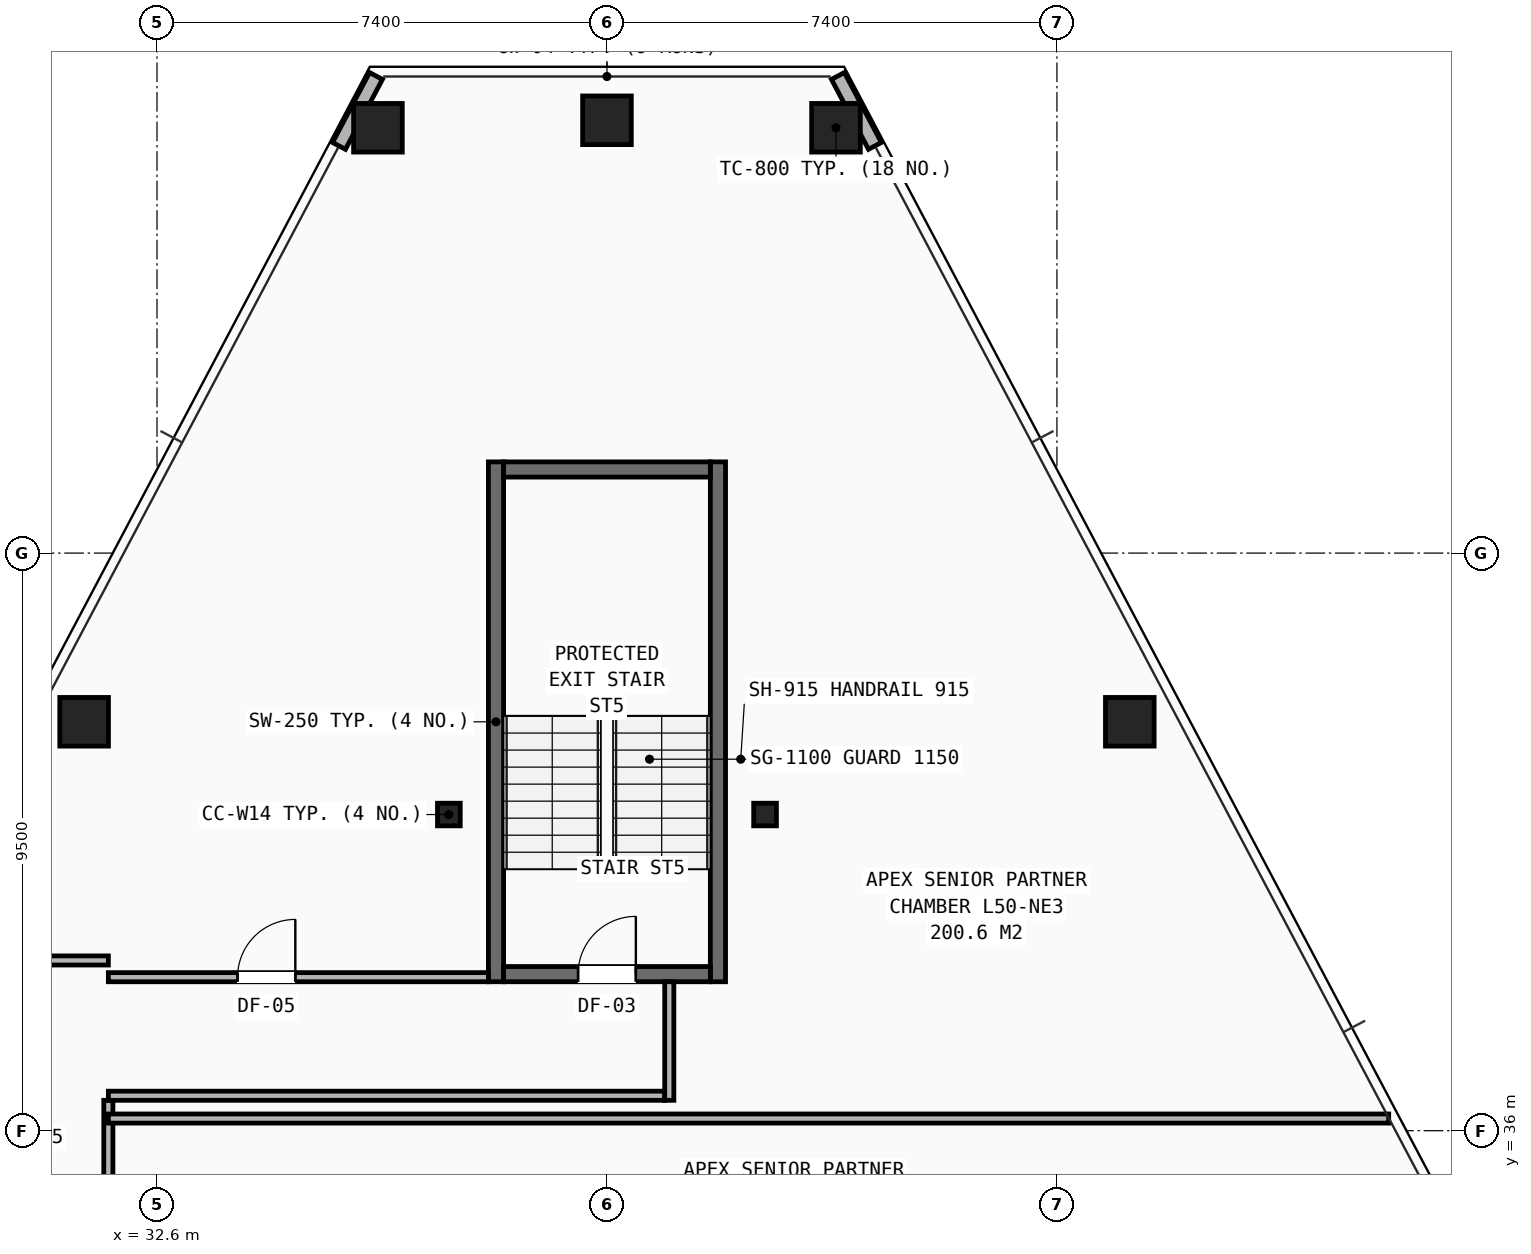
"""IFC4 building model, lengths in metres.
Left out: names, types, materials, properties, quantities, classifications, styles, units other than length and angle.
Written with IfcOpenShell. Run it as: python <this file> out.ifc"""

import sys

from ifc_helpers import new_model, si_unit, direction, frame, frame_2d, origin, origin_2d, place, context, subcontext, project, spatial, rectangle, hollow_rectangle, i_section, extrude, element, fill, save


model = new_model("IFC4")
c1 = context("Model", 3, precision=1e-05, world=origin(), true_north=direction((0.0, 1.0)))
c2 = subcontext(c1, "Body", "Model", "MODEL_VIEW")
j1 = project(units=[si_unit("LENGTHUNIT", "METRE"), si_unit("PLANEANGLEUNIT", "RADIAN")], contexts=[c1])
p1 = place(None, origin())
s1 = spatial("IfcSite", under=j1, at=p1, CompositionType="ELEMENT")
p2 = place(p1, origin())
s2 = spatial("IfcBuilding", under=s1, at=p2, CompositionType="ELEMENT")
p3 = place(p2, frame((0.0, 0.0, 175.8)))
s3 = spatial("IfcBuildingStorey", under=s2, at=p3, CompositionType="ELEMENT", Elevation=175.8)
for number, where, z_axis, x_axis in (
    (1, (37.4, 41.2, 0.0), (0.0, 0.0, 1.0), (1.0, 0.0, 0.0)),
    (2, (42.6, 41.2, 0.0), (0.0, 0.0, 1.0), (1.0, 0.0, 0.0)),
):
    element("IfcColumn", number, at=place(p3, frame(where, z_axis=z_axis, x_axis=x_axis)), inside=s3, PredefinedType="COLUMN", context=c2, shape_type="SweptSolid", body=[
        extrude(i_section(OverallWidth=0.374, OverallDepth=0.372, WebThickness=0.016, FlangeThickness=0.026, at=origin_2d()), origin(), (0.0, 0.0, 1.0), 3.45),
    ])
for number, where, z_axis, x_axis in (
    (3, (43.767, 52.495, 0.0), (0.0, 0.0, 1.0), (1.0, 0.0, 0.0)),
    (4, (40.0, 52.618, 0.0), (0.0, 0.0, 1.0), (1.0, 0.0, 0.0)),
    (5, (36.233, 52.495, 0.0), (0.0, 0.0, 1.0), (1.0, 0.0, 0.0)),
    (6, (31.402, 42.726, 0.0), (0.0, 0.0, 1.0), (1.0, 0.0, 0.0)),
    (7, (48.598, 42.726, 0.0), (0.0, 0.0, 1.0), (1.0, 0.0, 0.0)),
):
    element("IfcColumn", number, at=place(p3, frame(where, z_axis=z_axis, x_axis=x_axis)), inside=s3, PredefinedType="COLUMN", context=c2, shape_type="SweptSolid", body=[
        extrude(hollow_rectangle(XDim=0.8, YDim=0.8, WallThickness=0.055, at=origin_2d()), origin(), (0.0, 0.0, 1.0), 3.45),
    ])
for number, where, z_axis, x_axis in (
    (8, (36.201, 53.347, 0.0), (0.0, 0.0, 1.0), (-0.467, -0.884, 0.0)),
    (9, (44.407, 52.197, 0.0), (0.0, 0.0, 1.0), (-0.467, 0.884, 0.0)),
):
    element("IfcWall", number, at=place(p3, frame(where, z_axis=z_axis, x_axis=x_axis)), inside=s3, PredefinedType="SHEAR", context=c2, shape_type="SweptSolid", body=[
        extrude(rectangle(XDim=1.302, YDim=0.24, at=frame_2d((0.651, 0.0))), origin(), (0.0, 0.0, 1.0), 2.583),
    ])
p4 = place(p3, frame((31.8, 31.2, 0.0), z_axis=(0.0, 0.0, 1.0), x_axis=(0.0, 1.0, 0.0)))
e10 = element("IfcWall", 10, at=p4, inside=s3, PredefinedType="PARTITIONING", context=c2, shape_type="SweptSolid", body=[
    extrude(rectangle(XDim=5.3, YDim=0.15, at=frame_2d((2.65, 0.0))), origin(), (0.0, 0.0, 1.0), 2.252),
])
p5 = place(p4, frame((0.5, 0.0, 0.0)))
e11 = element("IfcOpeningElement", 11, at=p5, cuts=e10, PredefinedType="OPENING", context=c2, shape_type="SweptSolid", body=[
    extrude(rectangle(XDim=0.95, YDim=2.1, at=frame_2d((0.475, 1.05))), frame((0.0, 0.085, 0.0), z_axis=(0.0, -1.0, 0.0), x_axis=(1.0, 0.0, 0.0)), (0.0, 0.0, 1.0), 0.17),
])
p6 = place(p4, frame((2.9, 0.0, 0.0)))
e12 = element("IfcOpeningElement", 12, at=p6, cuts=e10, PredefinedType="OPENING", context=c2, shape_type="SweptSolid", body=[
    extrude(rectangle(XDim=0.95, YDim=2.1, at=frame_2d((0.475, 1.05))), frame((0.0, 0.085, 0.0), z_axis=(0.0, -1.0, 0.0), x_axis=(1.0, 0.0, 0.0)), (0.0, 0.0, 1.0), 0.17),
])
p7 = place(p3, frame((29.6, 38.8, 0.0), z_axis=(0.0, 0.0, 1.0), x_axis=(1.0, 0.0, 0.0)))
e13 = element("IfcWall", 13, at=p7, inside=s3, PredefinedType="PARTITIONING", context=c2, shape_type="SweptSolid", body=[
    extrude(rectangle(XDim=2.2, YDim=0.15, at=frame_2d((1.1, 0.0))), origin(), (0.0, 0.0, 1.0), 2.589),
])
p8 = place(p3, frame((31.8, 36.2, 0.0), z_axis=(0.0, 0.0, 1.0), x_axis=(1.0, 0.0, 0.0)))
e14 = element("IfcWall", 14, at=p8, inside=s3, PredefinedType="PARTITIONING", context=c2, shape_type="SweptSolid", body=[
    extrude(rectangle(XDim=21.056, YDim=0.15, at=frame_2d((10.528, 0.0))), origin(), (0.0, 0.0, 1.0), 2.589),
])
for number, where, z_axis, x_axis in (
    (15, (38.175, 38.45, 0.0), (0.0, 0.0, 1.0), (0.0, 1.0, 0.0)),
    (16, (41.825, 38.45, 0.0), (0.0, 0.0, 1.0), (0.0, 1.0, 0.0)),
):
    element("IfcWall", number, at=place(p3, frame(where, z_axis=z_axis, x_axis=x_axis)), inside=s3, PredefinedType="SHEAR", context=c2, shape_type="SweptSolid", body=[
        extrude(rectangle(XDim=8.55, YDim=0.25, at=frame_2d((4.275, 0.0))), origin(), (0.0, 0.0, 1.0), 3.21),
    ])
p9 = place(p3, frame((38.3, 38.575, 0.0), z_axis=(0.0, 0.0, 1.0), x_axis=(1.0, 0.0, 0.0)))
e17 = element("IfcWall", 17, at=p9, inside=s3, PredefinedType="SHEAR", context=c2, shape_type="SweptSolid", body=[
    extrude(rectangle(XDim=3.4, YDim=0.25, at=frame_2d((1.7, 0.0))), origin(), (0.0, 0.0, 1.0), 3.21),
])
p10 = place(p9, frame((1.225, 0.0, 0.0)))
e18 = element("IfcOpeningElement", 18, at=p10, cuts=e17, PredefinedType="OPENING", context=c2, shape_type="SweptSolid", body=[
    extrude(rectangle(XDim=0.95, YDim=2.1, at=frame_2d((0.475, 1.05))), frame((0.0, 0.135, 0.0), z_axis=(0.0, -1.0, 0.0), x_axis=(1.0, 0.0, 0.0)), (0.0, 0.0, 1.0), 0.27),
])
p11 = place(p3, frame((38.3, 46.875, 0.0), z_axis=(0.0, 0.0, 1.0), x_axis=(1.0, 0.0, 0.0)))
e19 = element("IfcWall", 19, at=p11, inside=s3, PredefinedType="SHEAR", context=c2, shape_type="SweptSolid", body=[
    extrude(rectangle(XDim=3.4, YDim=0.25, at=frame_2d((1.7, 0.0))), origin(), (0.0, 0.0, 1.0), 3.21),
])
p12 = place(p3, frame((31.8, 36.575, 0.0), z_axis=(0.0, 0.0, 1.0), x_axis=(1.0, 0.0, 0.0)))
e20 = element("IfcWall", 20, at=p12, inside=s3, PredefinedType="PARTITIONING", context=c2, shape_type="SweptSolid", body=[
    extrude(rectangle(XDim=9.15, YDim=0.15, at=frame_2d((4.575, 0.0))), origin(), (0.0, 0.0, 1.0), 3.21),
])
p13 = place(p3, frame((31.8, 38.525, 0.0), z_axis=(0.0, 0.0, 1.0), x_axis=(1.0, 0.0, 0.0)))
e21 = element("IfcWall", 21, at=p13, inside=s3, PredefinedType="PARTITIONING", context=c2, shape_type="SweptSolid", body=[
    extrude(rectangle(XDim=6.25, YDim=0.15, at=frame_2d((3.125, 0.0))), origin(), (0.0, 0.0, 1.0), 2.793),
])
p14 = place(p13, frame((2.125, 0.0, 0.0)))
e22 = element("IfcOpeningElement", 22, at=p14, cuts=e21, PredefinedType="OPENING", context=c2, shape_type="SweptSolid", body=[
    extrude(rectangle(XDim=0.95, YDim=2.1, at=frame_2d((0.475, 1.05))), frame((0.0, 0.085, 0.0), z_axis=(0.0, -1.0, 0.0), x_axis=(1.0, 0.0, 0.0)), (0.0, 0.0, 1.0), 0.17),
])
p15 = place(p3, frame((41.025, 36.5, 0.0), z_axis=(0.0, 0.0, 1.0), x_axis=(0.0, 1.0, 0.0)))
e23 = element("IfcWall", 23, at=p15, inside=s3, PredefinedType="PARTITIONING", context=c2, shape_type="SweptSolid", body=[
    extrude(rectangle(XDim=1.95, YDim=0.15, at=frame_2d((0.975, 0.0))), origin(), (0.0, 0.0, 1.0), 3.21),
])
p16 = place(p14, origin())
e24 = element("IfcDoor", 24, at=p16, inside=s3, OperationType="SINGLE_SWING_RIGHT", PredefinedType="DOOR", context=c2, shape_type="SweptSolid", body=[
    extrude(rectangle(XDim=0.95, YDim=2.1, at=frame_2d((0.475, 1.05))), frame((0.0, 0.025, 0.0), z_axis=(0.0, -1.0, 0.0), x_axis=(1.0, 0.0, 0.0)), (0.0, 0.0, 1.0), 0.05),
])
fill(e22, e24)
p17 = place(p10, origin())
e25 = element("IfcDoor", 25, at=p17, inside=s3, OperationType="SINGLE_SWING_RIGHT", PredefinedType="DOOR", context=c2, shape_type="SweptSolid", body=[
    extrude(rectangle(XDim=0.95, YDim=2.1, at=frame_2d((0.475, 1.05))), frame((0.0, 0.025, 0.0), z_axis=(0.0, -1.0, 0.0), x_axis=(1.0, 0.0, 0.0)), (0.0, 0.0, 1.0), 0.05),
])
fill(e18, e25)
save(model, sys.argv[1])
